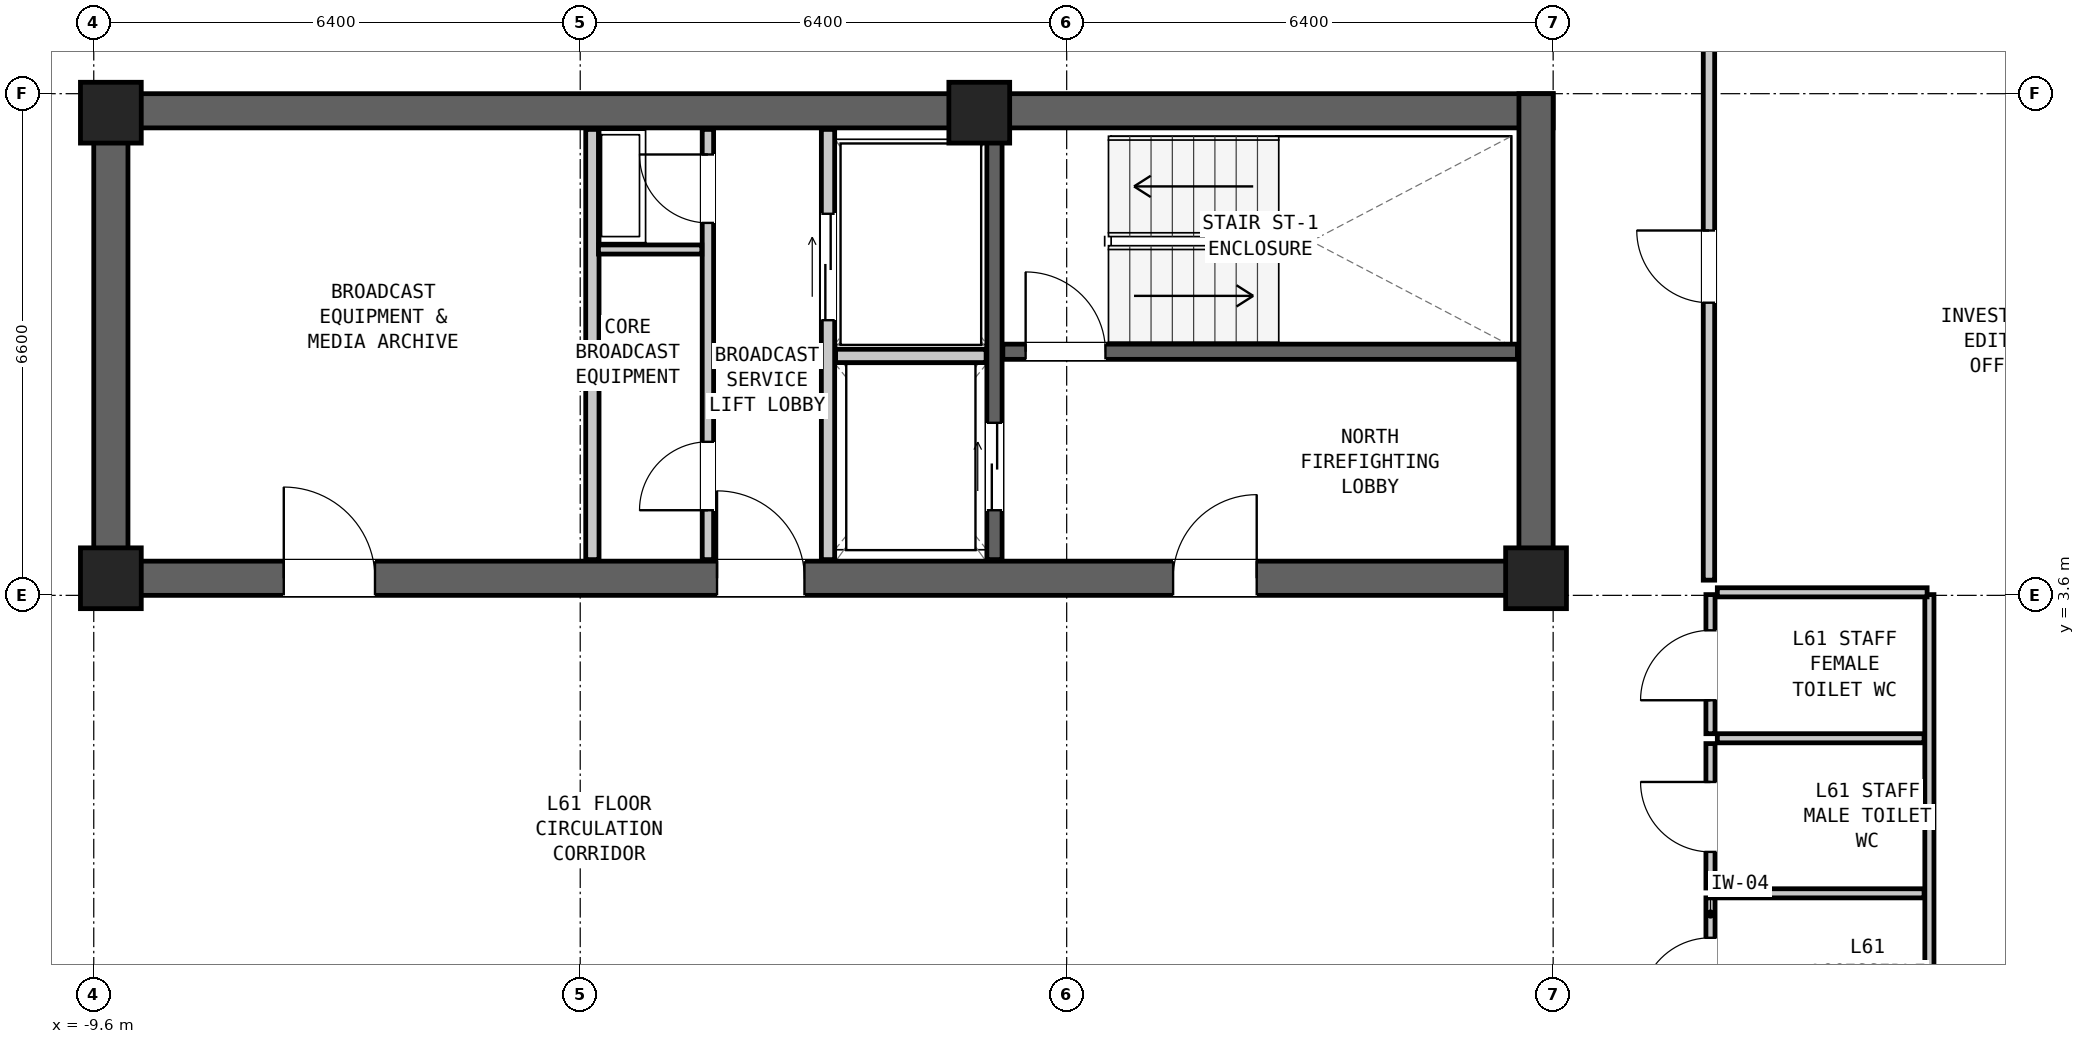
"""IFC4 building model, lengths in metres.
Left out: names, types, materials, properties, quantities, classifications, styles, units other than length and angle.
Written with IfcOpenShell. Run it as: python <this file> out.ifc"""

import sys

from ifc_helpers import new_model, si_unit, direction, frame, frame_2d, origin, origin_2d, place, context, subcontext, project, spatial, rectangle, extrude, element, fill, save


model = new_model("IFC4")
c1 = context("Model", 3, precision=1e-05, world=origin(), true_north=direction((0.0, 1.0)))
c2 = subcontext(c1, "Body", "Model", "MODEL_VIEW")
j1 = project(units=[si_unit("LENGTHUNIT", "METRE"), si_unit("PLANEANGLEUNIT", "RADIAN")], contexts=[c1])
p1 = place(None, origin())
s1 = spatial("IfcSite", under=j1, at=p1, CompositionType="ELEMENT")
p2 = place(p1, origin())
s2 = spatial("IfcBuilding", under=s1, at=p2, CompositionType="ELEMENT")
p3 = place(p2, frame((0.0, 0.0, 208.65)))
s3 = spatial("IfcBuildingStorey", under=s2, at=p3, CompositionType="ELEMENT", Elevation=208.65)
p4 = place(p3, frame((-9.6, 9.975, 0.0), z_axis=(0.0, 0.0, 1.0), x_axis=(1.0, 0.0, 0.0)))
e1 = element("IfcWall", 1, at=p4, inside=s3, PredefinedType="SHEAR", context=c2, shape_type="SweptSolid", body=[
    extrude(rectangle(XDim=19.2, YDim=0.45, at=frame_2d((9.6, 0.0))), origin(), (0.0, 0.0, 1.0), 3.05),
])
p5 = place(p3, frame((-9.6, 3.825, 0.0), z_axis=(0.0, 0.0, 1.0), x_axis=(1.0, 0.0, 0.0)))
e2 = element("IfcWall", 2, at=p5, inside=s3, PredefinedType="SHEAR", context=c2, shape_type="SweptSolid", body=[
    extrude(rectangle(XDim=19.2, YDim=0.45, at=frame_2d((9.6, 0.0))), origin(), (0.0, 0.0, 1.0), 3.05),
])
p6 = place(p5, frame((14.2, 0.0, 0.0)))
e3 = element("IfcOpeningElement", 3, at=p6, cuts=e2, PredefinedType="OPENING", context=c2, shape_type="SweptSolid", body=[
    extrude(rectangle(XDim=1.1, YDim=2.08, at=frame_2d((0.55, 1.04))), frame((0.0, 0.237, 0.0), z_axis=(0.0, -1.0, 0.0), x_axis=(1.0, 0.0, 0.0)), (0.0, 0.0, 1.0), 0.474),
])
p7 = place(p5, frame((8.2, 0.0, 0.0)))
e4 = element("IfcOpeningElement", 4, at=p7, cuts=e2, PredefinedType="OPENING", context=c2, shape_type="SweptSolid", body=[
    extrude(rectangle(XDim=1.15, YDim=2.1, at=frame_2d((0.575, 1.05))), frame((0.0, 0.237, 0.0), z_axis=(0.0, -1.0, 0.0), x_axis=(1.0, 0.0, 0.0)), (0.0, 0.0, 1.0), 0.474),
])
p8 = place(p5, frame((2.5, 0.0, 0.0)))
e5 = element("IfcOpeningElement", 5, at=p8, cuts=e2, PredefinedType="OPENING", context=c2, shape_type="SweptSolid", body=[
    extrude(rectangle(XDim=1.2, YDim=2.1, at=frame_2d((0.6, 1.05))), frame((0.0, 0.237, 0.0), z_axis=(0.0, -1.0, 0.0), x_axis=(1.0, 0.0, 0.0)), (0.0, 0.0, 1.0), 0.474),
])
for number, where, z_axis, x_axis in (
    (6, (-9.375, 3.6, 0.0), (0.0, 0.0, 1.0), (0.0, 1.0, 0.0)),
    (7, (9.375, 3.6, 0.0), (0.0, 0.0, 1.0), (0.0, 1.0, 0.0)),
):
    element("IfcWall", number, at=place(p3, frame(where, z_axis=z_axis, x_axis=x_axis)), inside=s3, PredefinedType="SHEAR", context=c2, shape_type="SweptSolid", body=[
        extrude(rectangle(XDim=6.6, YDim=0.45, at=frame_2d((3.3, 0.0))), origin(), (0.0, 0.0, 1.0), 3.05),
    ])
for number, where, z_axis, x_axis in (
    (8, (-9.375, 9.95, 0.0), (0.0, 0.0, 1.0), (1.0, 0.0, 0.0)),
    (9, (2.05, 9.95, 0.0), (0.0, 0.0, 1.0), (1.0, 0.0, 0.0)),
    (10, (-9.375, 3.825, 0.0), (0.0, 0.0, 1.0), (1.0, 0.0, 0.0)),
    (11, (9.375, 3.825, 0.0), (0.0, 0.0, 1.0), (1.0, 0.0, 0.0)),
):
    element("IfcColumn", number, at=place(p3, frame(where, z_axis=z_axis, x_axis=x_axis)), inside=s3, PredefinedType="COLUMN", context=c2, shape_type="SweptSolid", body=[
        extrude(rectangle(XDim=0.8, YDim=0.8, at=origin_2d()), origin(), (0.0, 0.0, 1.0), 3.05),
    ])
p9 = place(p3, frame((2.36, 6.805, 0.0), z_axis=(0.0, 0.0, 1.0), x_axis=(1.0, 0.0, 0.0)))
e12 = element("IfcWall", 12, at=p9, inside=s3, PredefinedType="SHEAR", context=c2, shape_type="SweptSolid", body=[
    extrude(rectangle(XDim=6.77, YDim=0.2, at=frame_2d((3.385, 0.0))), origin(), (0.0, 0.0, 1.0), 2.86),
])
p10 = place(p9, frame((0.3, 0.0, 0.0)))
e13 = element("IfcOpeningElement", 13, at=p10, cuts=e12, PredefinedType="OPENING", context=c2, shape_type="SweptSolid", body=[
    extrude(rectangle(XDim=1.05, YDim=2.08, at=frame_2d((0.525, 1.04))), frame((0.0, 0.112, 0.0), z_axis=(0.0, -1.0, 0.0), x_axis=(1.0, 0.0, 0.0)), (0.0, 0.0, 1.0), 0.224),
])
p11 = place(p3, frame((2.25, 4.07, 0.0), z_axis=(0.0, 0.0, 1.0), x_axis=(0.0, 1.0, 0.0)))
e14 = element("IfcWall", 14, at=p11, inside=s3, PredefinedType="SHEAR", context=c2, shape_type="SweptSolid", body=[
    extrude(rectangle(XDim=5.66, YDim=0.2, at=frame_2d((2.83, 0.0))), origin(), (0.0, 0.0, 1.0), 2.86),
])
p12 = place(p11, frame((0.65, 0.0, 0.0)))
e15 = element("IfcOpeningElement", 15, at=p12, cuts=e14, PredefinedType="OPENING", context=c2, shape_type="SweptSolid", body=[
    extrude(rectangle(XDim=1.15, YDim=2.08, at=frame_2d((0.575, 1.04))), frame((0.0, 0.112, 0.0), z_axis=(0.0, -1.0, 0.0), x_axis=(1.0, 0.0, 0.0)), (0.0, 0.0, 1.0), 0.224),
])
p13 = place(p3, frame((0.06, 4.07, 0.0), z_axis=(0.0, 0.0, 1.0), x_axis=(0.0, 1.0, 0.0)))
e16 = element("IfcWall", 16, at=p13, inside=s3, PredefinedType="PARTITIONING", context=c2, shape_type="SweptSolid", body=[
    extrude(rectangle(XDim=5.66, YDim=0.175, at=frame_2d((2.83, 0.0))), origin(), (0.0, 0.0, 1.0), 2.86),
])
p14 = place(p13, frame((3.15, 0.0, 0.0)))
e17 = element("IfcOpeningElement", 17, at=p14, cuts=e16, PredefinedType="OPENING", context=c2, shape_type="SweptSolid", body=[
    extrude(rectangle(XDim=1.4, YDim=2.12, at=frame_2d((0.7, 1.06))), frame((0.0, 0.1, 0.0), z_axis=(0.0, -1.0, 0.0), x_axis=(1.0, 0.0, 0.0)), (0.0, 0.0, 1.0), 0.199),
])
p15 = place(p3, frame((0.16, 6.75, 0.0), z_axis=(0.0, 0.0, 1.0), x_axis=(1.0, 0.0, 0.0)))
e18 = element("IfcWall", 18, at=p15, inside=s3, PredefinedType="PARTITIONING", context=c2, shape_type="SweptSolid", body=[
    extrude(rectangle(XDim=1.98, YDim=0.175, at=frame_2d((0.99, 0.0))), origin(), (0.0, 0.0, 1.0), 2.86),
])
p16 = place(p3, frame((-3.04, 4.07, 0.0), z_axis=(0.0, 0.0, 1.0), x_axis=(0.0, 1.0, 0.0)))
e19 = element("IfcWall", 19, at=p16, inside=s3, PredefinedType="PARTITIONING", context=c2, shape_type="SweptSolid", body=[
    extrude(rectangle(XDim=5.66, YDim=0.175, at=frame_2d((2.83, 0.0))), origin(), (0.0, 0.0, 1.0), 2.86),
])
p17 = place(p3, frame((-1.52, 4.07, 0.0), z_axis=(0.0, 0.0, 1.0), x_axis=(0.0, 1.0, 0.0)))
e20 = element("IfcWall", 20, at=p17, inside=s3, PredefinedType="PARTITIONING", context=c2, shape_type="SweptSolid", body=[
    extrude(rectangle(XDim=5.66, YDim=0.15, at=frame_2d((2.83, 0.0))), origin(), (0.0, 0.0, 1.0), 2.86),
])
p18 = place(p17, frame((4.43, 0.0, 0.0)))
e21 = element("IfcOpeningElement", 21, at=p18, cuts=e20, PredefinedType="OPENING", context=c2, shape_type="SweptSolid", body=[
    extrude(rectangle(XDim=0.9, YDim=2.05, at=frame_2d((0.45, 1.025))), frame((0.0, 0.087, 0.0), z_axis=(0.0, -1.0, 0.0), x_axis=(1.0, 0.0, 0.0)), (0.0, 0.0, 1.0), 0.174),
])
p19 = place(p17, frame((0.65, 0.0, 0.0)))
e22 = element("IfcOpeningElement", 22, at=p19, cuts=e20, PredefinedType="OPENING", context=c2, shape_type="SweptSolid", body=[
    extrude(rectangle(XDim=0.9, YDim=2.05, at=frame_2d((0.45, 1.025))), frame((0.0, 0.087, 0.0), z_axis=(0.0, -1.0, 0.0), x_axis=(1.0, 0.0, 0.0)), (0.0, 0.0, 1.0), 0.174),
])
p20 = place(p3, frame((-2.96, 8.15, 0.0), z_axis=(0.0, 0.0, 1.0), x_axis=(1.0, 0.0, 0.0)))
e23 = element("IfcWall", 23, at=p20, inside=s3, PredefinedType="PARTITIONING", context=c2, shape_type="SweptSolid", body=[
    extrude(rectangle(XDim=1.36, YDim=0.12, at=frame_2d((0.68, 0.0))), origin(), (0.0, 0.0, 1.0), 2.86),
])
p21 = place(p3, frame((11.67, -2.32, 0.0), z_axis=(0.0, 0.0, 1.0), x_axis=(0.0, 1.0, 0.0)))
e24 = element("IfcWall", 24, at=p21, inside=s3, PredefinedType="PARTITIONING", context=c2, shape_type="SweptSolid", body=[
    extrude(rectangle(XDim=1.94, YDim=0.12, at=frame_2d((0.97, 0.0))), origin(), (0.0, 0.0, 1.0), 2.86),
])
p22 = place(p21, frame((0.495, 0.0, 0.0)))
e25 = element("IfcOpeningElement", 25, at=p22, cuts=e24, PredefinedType="OPENING", context=c2, shape_type="SweptSolid", body=[
    extrude(rectangle(XDim=0.92, YDim=2.1, at=frame_2d((0.46, 1.05))), frame((0.0, 0.072, 0.0), z_axis=(0.0, -1.0, 0.0), x_axis=(1.0, 0.0, 0.0)), (0.0, 0.0, 1.0), 0.144),
])
p23 = place(p3, frame((11.67, -0.25, 0.0), z_axis=(0.0, 0.0, 1.0), x_axis=(0.0, 1.0, 0.0)))
e26 = element("IfcWall", 26, at=p23, inside=s3, PredefinedType="PARTITIONING", context=c2, shape_type="SweptSolid", body=[
    extrude(rectangle(XDim=1.9, YDim=0.12, at=frame_2d((0.95, 0.0))), origin(), (0.0, 0.0, 1.0), 2.86),
])
p24 = place(p23, frame((0.475, 0.0, 0.0)))
e27 = element("IfcOpeningElement", 27, at=p24, cuts=e26, PredefinedType="OPENING", context=c2, shape_type="SweptSolid", body=[
    extrude(rectangle(XDim=0.92, YDim=2.1, at=frame_2d((0.46, 1.05))), frame((0.0, 0.072, 0.0), z_axis=(0.0, -1.0, 0.0), x_axis=(1.0, 0.0, 0.0)), (0.0, 0.0, 1.0), 0.144),
])
p25 = place(p3, frame((11.67, 1.78, 0.0), z_axis=(0.0, 0.0, 1.0), x_axis=(0.0, 1.0, 0.0)))
e28 = element("IfcWall", 28, at=p25, inside=s3, PredefinedType="PARTITIONING", context=c2, shape_type="SweptSolid", body=[
    extrude(rectangle(XDim=1.83, YDim=0.12, at=frame_2d((0.915, 0.0))), origin(), (0.0, 0.0, 1.0), 2.86),
])
p26 = place(p25, frame((0.44, 0.0, 0.0)))
e29 = element("IfcOpeningElement", 29, at=p26, cuts=e28, PredefinedType="OPENING", context=c2, shape_type="SweptSolid", body=[
    extrude(rectangle(XDim=0.92, YDim=2.1, at=frame_2d((0.46, 1.05))), frame((0.0, 0.072, 0.0), z_axis=(0.0, -1.0, 0.0), x_axis=(1.0, 0.0, 0.0)), (0.0, 0.0, 1.0), 0.144),
])
p27 = place(p3, frame((14.55, -2.32, 0.0), z_axis=(0.0, 0.0, 1.0), x_axis=(0.0, 1.0, 0.0)))
e30 = element("IfcWall", 30, at=p27, inside=s3, PredefinedType="PARTITIONING", context=c2, shape_type="SweptSolid", body=[
    extrude(rectangle(XDim=5.93, YDim=0.12, at=frame_2d((2.965, 0.0))), origin(), (0.0, 0.0, 1.0), 2.86),
])
p28 = place(p3, frame((11.76, 3.64, 0.0), z_axis=(0.0, 0.0, 1.0), x_axis=(1.0, 0.0, 0.0)))
e31 = element("IfcWall", 31, at=p28, inside=s3, PredefinedType="PARTITIONING", context=c2, shape_type="SweptSolid", body=[
    extrude(rectangle(XDim=2.76, YDim=0.12, at=frame_2d((1.38, 0.0))), origin(), (0.0, 0.0, 1.0), 1.981),
])
for number, where, z_axis, x_axis in (
    (32, (11.76, -0.32, 0.0), (0.0, 0.0, 1.0), (1.0, 0.0, 0.0)),
    (33, (11.76, 1.72, 0.0), (0.0, 0.0, 1.0), (1.0, 0.0, 0.0)),
):
    element("IfcWall", number, at=place(p3, frame(where, z_axis=z_axis, x_axis=x_axis)), inside=s3, PredefinedType="PARTITIONING", context=c2, shape_type="SweptSolid", body=[
        extrude(rectangle(XDim=2.72, YDim=0.12, at=frame_2d((1.36, 0.0))), origin(), (0.0, 0.0, 1.0), 2.86),
    ])
p29 = place(p3, frame((11.65, 3.8, 0.0), z_axis=(0.0, 0.0, 1.0), x_axis=(0.0, 1.0, 0.0)))
e34 = element("IfcWall", 34, at=p29, inside=s3, PredefinedType="PARTITIONING", context=c2, shape_type="SweptSolid", body=[
    extrude(rectangle(XDim=8.25, YDim=0.15, at=frame_2d((4.125, 0.0))), origin(), (0.0, 0.0, 1.0), 2.86),
])
p30 = place(p29, frame((3.65, 0.0, 0.0)))
e35 = element("IfcOpeningElement", 35, at=p30, cuts=e34, PredefinedType="OPENING", context=c2, shape_type="SweptSolid", body=[
    extrude(rectangle(XDim=0.95, YDim=2.1, at=frame_2d((0.475, 1.05))), frame((0.0, 0.087, 0.0), z_axis=(0.0, -1.0, 0.0), x_axis=(1.0, 0.0, 0.0)), (0.0, 0.0, 1.0), 0.174),
])
p31 = place(p10, origin())
e36 = element("IfcDoor", 36, at=p31, inside=s3, OperationType="SINGLE_SWING_LEFT", PredefinedType="DOOR", context=c2, shape_type="SweptSolid", body=[
    extrude(rectangle(XDim=1.05, YDim=2.08, at=frame_2d((0.525, 1.04))), frame((0.0, 0.025, 0.0), z_axis=(0.0, -1.0, 0.0), x_axis=(1.0, 0.0, 0.0)), (0.0, 0.0, 1.0), 0.05),
])
fill(e13, e36)
p32 = place(p6, origin())
e37 = element("IfcDoor", 37, at=p32, inside=s3, OperationType="SINGLE_SWING_RIGHT", PredefinedType="DOOR", context=c2, shape_type="SweptSolid", body=[
    extrude(rectangle(XDim=1.1, YDim=2.08, at=frame_2d((0.55, 1.04))), frame((0.0, 0.025, 0.0), z_axis=(0.0, -1.0, 0.0), x_axis=(1.0, 0.0, 0.0)), (0.0, 0.0, 1.0), 0.05),
])
fill(e3, e37)
p33 = place(p12, origin())
e38 = element("IfcDoor", 38, at=p33, inside=s3, OperationType="DOUBLE_DOOR_SLIDING", PredefinedType="DOOR", context=c2, shape_type="SweptSolid", body=[
    extrude(rectangle(XDim=1.15, YDim=2.08, at=frame_2d((0.575, 1.04))), frame((0.0, 0.025, 0.0), z_axis=(0.0, -1.0, 0.0), x_axis=(1.0, 0.0, 0.0)), (0.0, 0.0, 1.0), 0.05),
])
fill(e15, e38)
p34 = place(p14, origin())
e39 = element("IfcDoor", 39, at=p34, inside=s3, OperationType="DOUBLE_DOOR_SLIDING", PredefinedType="DOOR", context=c2, shape_type="SweptSolid", body=[
    extrude(rectangle(XDim=1.4, YDim=2.12, at=frame_2d((0.7, 1.06))), frame((0.0, 0.025, 0.0), z_axis=(0.0, -1.0, 0.0), x_axis=(1.0, 0.0, 0.0)), (0.0, 0.0, 1.0), 0.05),
])
fill(e17, e39)
p35 = place(p7, origin())
e40 = element("IfcDoor", 40, at=p35, inside=s3, OperationType="SINGLE_SWING_LEFT", PredefinedType="DOOR", context=c2, shape_type="SweptSolid", body=[
    extrude(rectangle(XDim=1.15, YDim=2.1, at=frame_2d((0.575, 1.05))), frame((0.0, 0.025, 0.0), z_axis=(0.0, -1.0, 0.0), x_axis=(1.0, 0.0, 0.0)), (0.0, 0.0, 1.0), 0.05),
])
fill(e4, e40)
p36 = place(p18, origin())
e41 = element("IfcDoor", 41, at=p36, inside=s3, OperationType="SINGLE_SWING_RIGHT", PredefinedType="DOOR", context=c2, shape_type="SweptSolid", body=[
    extrude(rectangle(XDim=0.9, YDim=2.05, at=frame_2d((0.45, 1.025))), frame((0.0, 0.025, 0.0), z_axis=(0.0, -1.0, 0.0), x_axis=(1.0, 0.0, 0.0)), (0.0, 0.0, 1.0), 0.05),
])
fill(e21, e41)
p37 = place(p19, origin())
e42 = element("IfcDoor", 42, at=p37, inside=s3, OperationType="SINGLE_SWING_LEFT", PredefinedType="DOOR", context=c2, shape_type="SweptSolid", body=[
    extrude(rectangle(XDim=0.9, YDim=2.05, at=frame_2d((0.45, 1.025))), frame((0.0, 0.025, 0.0), z_axis=(0.0, -1.0, 0.0), x_axis=(1.0, 0.0, 0.0)), (0.0, 0.0, 1.0), 0.05),
])
fill(e22, e42)
p38 = place(p8, origin())
e43 = element("IfcDoor", 43, at=p38, inside=s3, OperationType="SINGLE_SWING_LEFT", PredefinedType="DOOR", context=c2, shape_type="SweptSolid", body=[
    extrude(rectangle(XDim=1.2, YDim=2.1, at=frame_2d((0.6, 1.05))), frame((0.0, 0.025, 0.0), z_axis=(0.0, -1.0, 0.0), x_axis=(1.0, 0.0, 0.0)), (0.0, 0.0, 1.0), 0.05),
])
fill(e5, e43)
p39 = place(p22, origin())
e44 = element("IfcDoor", 44, at=p39, inside=s3, OperationType="SINGLE_SWING_LEFT", PredefinedType="DOOR", context=c2, shape_type="SweptSolid", body=[
    extrude(rectangle(XDim=0.92, YDim=2.1, at=frame_2d((0.46, 1.05))), frame((0.0, 0.025, 0.0), z_axis=(0.0, -1.0, 0.0), x_axis=(1.0, 0.0, 0.0)), (0.0, 0.0, 1.0), 0.05),
])
fill(e25, e44)
p40 = place(p24, origin())
e45 = element("IfcDoor", 45, at=p40, inside=s3, OperationType="SINGLE_SWING_RIGHT", PredefinedType="DOOR", context=c2, shape_type="SweptSolid", body=[
    extrude(rectangle(XDim=0.92, YDim=2.1, at=frame_2d((0.46, 1.05))), frame((0.0, 0.025, 0.0), z_axis=(0.0, -1.0, 0.0), x_axis=(1.0, 0.0, 0.0)), (0.0, 0.0, 1.0), 0.05),
])
fill(e27, e45)
p41 = place(p26, origin())
e46 = element("IfcDoor", 46, at=p41, inside=s3, OperationType="SINGLE_SWING_LEFT", PredefinedType="DOOR", context=c2, shape_type="SweptSolid", body=[
    extrude(rectangle(XDim=0.92, YDim=2.1, at=frame_2d((0.46, 1.05))), frame((0.0, 0.025, 0.0), z_axis=(0.0, -1.0, 0.0), x_axis=(1.0, 0.0, 0.0)), (0.0, 0.0, 1.0), 0.05),
])
fill(e29, e46)
p42 = place(p30, origin())
e47 = element("IfcDoor", 47, at=p42, inside=s3, OperationType="SINGLE_SWING_RIGHT", PredefinedType="DOOR", context=c2, shape_type="SweptSolid", body=[
    extrude(rectangle(XDim=0.95, YDim=2.1, at=frame_2d((0.475, 1.05))), frame((0.0, 0.025, 0.0), z_axis=(0.0, -1.0, 0.0), x_axis=(1.0, 0.0, 0.0)), (0.0, 0.0, 1.0), 0.05),
])
fill(e35, e47)
save(model, sys.argv[1])
